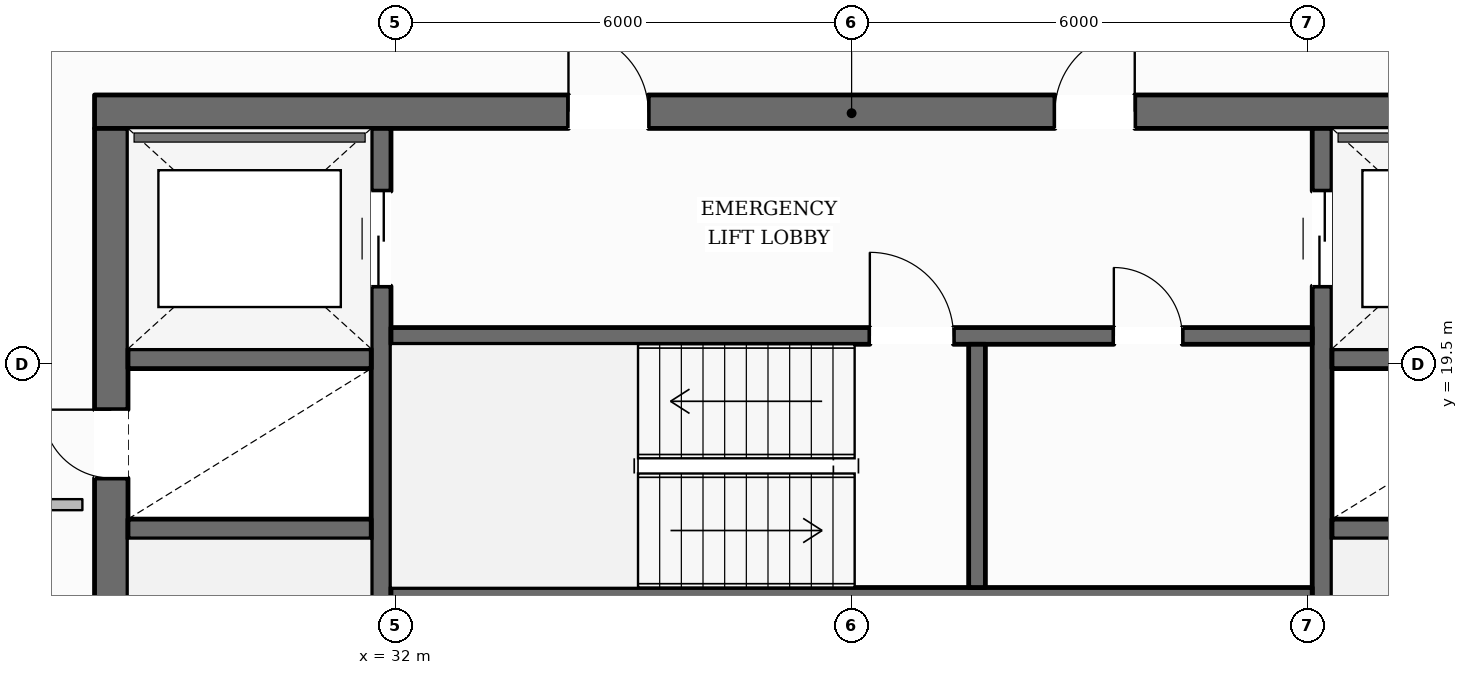
"""IFC4 building model, lengths in metres.
Left out: names, types, materials, properties, quantities, classifications, styles, units other than length and angle.
Written with IfcOpenShell. Run it as: python <this file> out.ifc"""

import sys

from ifc_helpers import new_model, si_unit, direction, frame, frame_2d, origin, place, context, subcontext, project, spatial, rectangle, extrude, element, fill, save


model = new_model("IFC4")
c1 = context("Model", 3, precision=1e-05, world=origin(), true_north=direction((0.0, 1.0)))
c2 = subcontext(c1, "Body", "Model", "MODEL_VIEW")
j1 = project(units=[si_unit("LENGTHUNIT", "METRE"), si_unit("PLANEANGLEUNIT", "RADIAN")], contexts=[c1])
p1 = place(None, origin())
s1 = spatial("IfcSite", under=j1, at=p1, CompositionType="ELEMENT")
p2 = place(p1, origin())
s2 = spatial("IfcBuilding", under=s1, at=p2, CompositionType="ELEMENT")
p3 = place(p2, frame((0.0, 0.0, 230.45)))
s3 = spatial("IfcBuildingStorey", under=s2, at=p3, CompositionType="ELEMENT", Elevation=230.45)
p4 = place(p3, frame((28.04, 22.82, 0.0), z_axis=(0.0, 0.0, 1.0), x_axis=(1.0, 0.0, 0.0)))
e1 = element("IfcWall", 1, at=p4, inside=s3, PredefinedType="SOLIDWALL", context=c2, shape_type="SweptSolid", body=[
    extrude(rectangle(XDim=19.92, YDim=0.44, at=frame_2d((9.96, 0.0))), origin(), (0.0, 0.0, 1.0), 3.43),
])
p5 = place(p4, frame((6.235, 0.0, 0.0)))
e2 = element("IfcOpeningElement", 2, at=p5, cuts=e1, PredefinedType="OPENING", context=c2, shape_type="SweptSolid", body=[
    extrude(rectangle(XDim=1.05, YDim=2.15, at=frame_2d((0.525, 1.075))), frame((0.0, 0.23, 0.0), z_axis=(0.0, -1.0, 0.0), x_axis=(1.0, 0.0, 0.0)), (0.0, 0.0, 1.0), 0.46),
])
p6 = place(p4, frame((12.635, 0.0, 0.0)))
e3 = element("IfcOpeningElement", 3, at=p6, cuts=e1, PredefinedType="OPENING", context=c2, shape_type="SweptSolid", body=[
    extrude(rectangle(XDim=1.05, YDim=2.15, at=frame_2d((0.525, 1.075))), frame((0.0, 0.23, 0.0), z_axis=(0.0, -1.0, 0.0), x_axis=(1.0, 0.0, 0.0)), (0.0, 0.0, 1.0), 0.46),
])
p7 = place(p3, frame((28.26, 9.6, 0.0), z_axis=(0.0, 0.0, 1.0), x_axis=(0.0, 1.0, 0.0)))
e4 = element("IfcWall", 4, at=p7, inside=s3, PredefinedType="SOLIDWALL", context=c2, shape_type="SweptSolid", body=[
    extrude(rectangle(XDim=13.0, YDim=0.44, at=frame_2d((6.5, 0.0))), origin(), (0.0, 0.0, 1.0), 3.43),
])
p8 = place(p7, frame((0.2, 0.0, 0.0)))
e5 = element("IfcOpeningElement", 5, at=p8, cuts=e4, PredefinedType="OPENING", context=c2, shape_type="SweptSolid", body=[
    extrude(rectangle(XDim=1.1, YDim=2.15, at=frame_2d((0.55, 1.075))), frame((0.0, 0.23, 0.0), z_axis=(0.0, -1.0, 0.0), x_axis=(1.0, 0.0, 0.0)), (0.0, 0.0, 1.0), 0.46),
])
p9 = place(p7, frame((8.4, 0.0, 0.0)))
e6 = element("IfcOpeningElement", 6, at=p9, cuts=e4, PredefinedType="OPENING", context=c2, shape_type="SweptSolid", body=[
    extrude(rectangle(XDim=0.9, YDim=2.1, at=frame_2d((0.45, 1.05))), frame((0.0, 0.23, 0.0), z_axis=(0.0, -1.0, 0.0), x_axis=(1.0, 0.0, 0.0)), (0.0, 0.0, 1.0), 0.46),
])
p10 = place(p3, frame((31.81, 9.6, 0.0), z_axis=(0.0, 0.0, 1.0), x_axis=(0.0, 1.0, 0.0)))
e7 = element("IfcWall", 7, at=p10, inside=s3, PredefinedType="SHEAR", context=c2, shape_type="SweptSolid", body=[
    extrude(rectangle(XDim=13.0, YDim=0.26, at=frame_2d((6.5, 0.0))), origin(), (0.0, 0.0, 1.0), 3.43),
])
p11 = place(p10, frame((10.925, 0.0, 0.0)))
e8 = element("IfcOpeningElement", 8, at=p11, cuts=e7, PredefinedType="OPENING", context=c2, shape_type="SweptSolid", body=[
    extrude(rectangle(XDim=1.25, YDim=2.25, at=frame_2d((0.625, 1.125))), frame((0.0, 0.14, 0.0), z_axis=(0.0, -1.0, 0.0), x_axis=(1.0, 0.0, 0.0)), (0.0, 0.0, 1.0), 0.28),
])
p12 = place(p3, frame((44.19, 9.6, 0.0), z_axis=(0.0, 0.0, 1.0), x_axis=(0.0, 1.0, 0.0)))
e9 = element("IfcWall", 9, at=p12, inside=s3, PredefinedType="SHEAR", context=c2, shape_type="SweptSolid", body=[
    extrude(rectangle(XDim=13.0, YDim=0.26, at=frame_2d((6.5, 0.0))), origin(), (0.0, 0.0, 1.0), 3.43),
])
p13 = place(p12, frame((10.925, 0.0, 0.0)))
e10 = element("IfcOpeningElement", 10, at=p13, cuts=e9, PredefinedType="OPENING", context=c2, shape_type="SweptSolid", body=[
    extrude(rectangle(XDim=1.25, YDim=2.25, at=frame_2d((0.625, 1.125))), frame((0.0, 0.14, 0.0), z_axis=(0.0, -1.0, 0.0), x_axis=(1.0, 0.0, 0.0)), (0.0, 0.0, 1.0), 0.28),
])
for number, where, z_axis, x_axis in (
    (11, (28.48, 17.33, 0.0), (0.0, 0.0, 1.0), (1.0, 0.0, 0.0)),
    (12, (28.48, 19.57, 0.0), (0.0, 0.0, 1.0), (1.0, 0.0, 0.0)),
    (13, (44.32, 17.33, 0.0), (0.0, 0.0, 1.0), (1.0, 0.0, 0.0)),
    (14, (44.32, 19.57, 0.0), (0.0, 0.0, 1.0), (1.0, 0.0, 0.0)),
):
    element("IfcWall", number, at=place(p3, frame(where, z_axis=z_axis, x_axis=x_axis)), inside=s3, PredefinedType="SHEAR", context=c2, shape_type="SweptSolid", body=[
        extrude(rectangle(XDim=3.2, YDim=0.26, at=frame_2d((1.6, 0.0))), origin(), (0.0, 0.0, 1.0), 3.43),
    ])
p14 = place(p3, frame((31.94, 19.87, 0.0), z_axis=(0.0, 0.0, 1.0), x_axis=(1.0, 0.0, 0.0)))
e15 = element("IfcWall", 15, at=p14, inside=s3, PredefinedType="SOLIDWALL", context=c2, shape_type="SweptSolid", body=[
    extrude(rectangle(XDim=12.12, YDim=0.22, at=frame_2d((6.06, 0.0))), origin(), (0.0, 0.0, 1.0), 3.43),
])
p15 = place(p14, frame((6.3, 0.0, 0.0)))
e16 = element("IfcOpeningElement", 16, at=p15, cuts=e15, PredefinedType="OPENING", context=c2, shape_type="SweptSolid", body=[
    extrude(rectangle(XDim=1.1, YDim=2.15, at=frame_2d((0.55, 1.075))), frame((0.0, 0.12, 0.0), z_axis=(0.0, -1.0, 0.0), x_axis=(1.0, 0.0, 0.0)), (0.0, 0.0, 1.0), 0.24),
])
p16 = place(p14, frame((9.51, 0.0, 0.0)))
e17 = element("IfcOpeningElement", 17, at=p16, cuts=e15, PredefinedType="OPENING", context=c2, shape_type="SweptSolid", body=[
    extrude(rectangle(XDim=0.9, YDim=2.1, at=frame_2d((0.45, 1.05))), frame((0.0, 0.12, 0.0), z_axis=(0.0, -1.0, 0.0), x_axis=(1.0, 0.0, 0.0)), (0.0, 0.0, 1.0), 0.24),
])
p17 = place(p3, frame((31.94, 16.45, 0.0), z_axis=(0.0, 0.0, 1.0), x_axis=(1.0, 0.0, 0.0)))
e18 = element("IfcWall", 18, at=p17, inside=s3, PredefinedType="SOLIDWALL", context=c2, shape_type="SweptSolid", body=[
    extrude(rectangle(XDim=12.12, YDim=0.22, at=frame_2d((6.06, 0.0))), origin(), (0.0, 0.0, 1.0), 3.43),
])
p18 = place(p3, frame((39.65, 16.56, 0.0), z_axis=(0.0, 0.0, 1.0), x_axis=(0.0, 1.0, 0.0)))
e19 = element("IfcWall", 19, at=p18, inside=s3, PredefinedType="SOLIDWALL", context=c2, shape_type="SweptSolid", body=[
    extrude(rectangle(XDim=3.2, YDim=0.22, at=frame_2d((1.6, 0.0))), origin(), (0.0, 0.0, 1.0), 3.43),
])
p19 = place(p3, frame((14.597, 10.907, 0.0), z_axis=(0.0, 0.0, 1.0), x_axis=(0.494693460531, 0.869067534837, 0.0)))
e20 = element("IfcWall", 20, at=p19, inside=s3, PredefinedType="STANDARD", context=c2, shape_type="SweptSolid", body=[
    extrude(rectangle(XDim=39.744, YDim=0.35, at=frame_2d((19.872, 0.0))), origin(), (0.0, 0.0, 1.0), 2.962),
])
p20 = place(p19, frame((35.308, 0.0, 0.55)))
e21 = element("IfcOpeningElement", 21, at=p20, cuts=e20, PredefinedType="OPENING", context=c2, shape_type="SweptSolid", body=[
    extrude(rectangle(XDim=1.45, YDim=1.6, at=frame_2d((0.725, 0.8))), frame((0.0, 0.185, 0.0), z_axis=(0.0, -1.0, 0.0), x_axis=(1.0, 0.0, 0.0)), (0.0, 0.0, 1.0), 0.37),
])
p21 = place(p19, frame((28.843, 0.0, 0.55)))
e22 = element("IfcOpeningElement", 22, at=p21, cuts=e20, PredefinedType="OPENING", context=c2, shape_type="SweptSolid", body=[
    extrude(rectangle(XDim=1.45, YDim=1.6, at=frame_2d((0.725, 0.8))), frame((0.0, 0.185, 0.0), z_axis=(0.0, -1.0, 0.0), x_axis=(1.0, 0.0, 0.0)), (0.0, 0.0, 1.0), 0.37),
])
p22 = place(p19, frame((22.377, 0.0, 0.55)))
e23 = element("IfcOpeningElement", 23, at=p22, cuts=e20, PredefinedType="OPENING", context=c2, shape_type="SweptSolid", body=[
    extrude(rectangle(XDim=1.45, YDim=1.6, at=frame_2d((0.725, 0.8))), frame((0.0, 0.185, 0.0), z_axis=(0.0, -1.0, 0.0), x_axis=(1.0, 0.0, 0.0)), (0.0, 0.0, 1.0), 0.37),
])
p23 = place(p19, frame((9.446, 0.0, 0.55)))
e24 = element("IfcOpeningElement", 24, at=p23, cuts=e20, PredefinedType="OPENING", context=c2, shape_type="SweptSolid", body=[
    extrude(rectangle(XDim=1.45, YDim=1.6, at=frame_2d((0.725, 0.8))), frame((0.0, 0.185, 0.0), z_axis=(0.0, -1.0, 0.0), x_axis=(1.0, 0.0, 0.0)), (0.0, 0.0, 1.0), 0.37),
])
p24 = place(p19, frame((2.98, 0.0, 0.55)))
e25 = element("IfcOpeningElement", 25, at=p24, cuts=e20, PredefinedType="OPENING", context=c2, shape_type="SweptSolid", body=[
    extrude(rectangle(XDim=1.45, YDim=1.6, at=frame_2d((0.725, 0.8))), frame((0.0, 0.185, 0.0), z_axis=(0.0, -1.0, 0.0), x_axis=(1.0, 0.0, 0.0)), (0.0, 0.0, 1.0), 0.37),
])
p25 = place(p3, frame((41.688, 45.48, 0.0), z_axis=(0.0, 0.0, 1.0), x_axis=(0.491295447758, -0.870992986775, 0.0)))
e26 = element("IfcWall", 26, at=p25, inside=s3, PredefinedType="STANDARD", context=c2, shape_type="SweptSolid", body=[
    extrude(rectangle(XDim=39.483, YDim=0.35, at=frame_2d((19.742, 0.0))), origin(), (0.0, 0.0, 1.0), 2.962),
])
p26 = place(p25, frame((9.471, 0.0, 0.0)))
e27 = element("IfcOpeningElement", 27, at=p26, cuts=e26, PredefinedType="OPENING", context=c2, shape_type="SweptSolid", body=[
    extrude(rectangle(XDim=1.0, YDim=2.2, at=frame_2d((0.5, 1.1))), frame((0.0, 0.185, 0.0), z_axis=(0.0, -1.0, 0.0), x_axis=(1.0, 0.0, 0.0)), (0.0, 0.0, 1.0), 0.37),
])
p27 = place(p25, frame((35.076, 0.0, 0.55)))
e28 = element("IfcOpeningElement", 28, at=p27, cuts=e26, PredefinedType="OPENING", context=c2, shape_type="SweptSolid", body=[
    extrude(rectangle(XDim=1.45, YDim=1.6, at=frame_2d((0.725, 0.8))), frame((0.0, 0.185, 0.0), z_axis=(0.0, -1.0, 0.0), x_axis=(1.0, 0.0, 0.0)), (0.0, 0.0, 1.0), 0.37),
])
p28 = place(p25, frame((28.654, 0.0, 0.55)))
e29 = element("IfcOpeningElement", 29, at=p28, cuts=e26, PredefinedType="OPENING", context=c2, shape_type="SweptSolid", body=[
    extrude(rectangle(XDim=1.45, YDim=1.6, at=frame_2d((0.725, 0.8))), frame((0.0, 0.185, 0.0), z_axis=(0.0, -1.0, 0.0), x_axis=(1.0, 0.0, 0.0)), (0.0, 0.0, 1.0), 0.37),
])
p29 = place(p25, frame((22.232, 0.0, 0.55)))
e30 = element("IfcOpeningElement", 30, at=p29, cuts=e26, PredefinedType="OPENING", context=c2, shape_type="SweptSolid", body=[
    extrude(rectangle(XDim=1.45, YDim=1.6, at=frame_2d((0.725, 0.8))), frame((0.0, 0.185, 0.0), z_axis=(0.0, -1.0, 0.0), x_axis=(1.0, 0.0, 0.0)), (0.0, 0.0, 1.0), 0.37),
])
p30 = place(p25, frame((2.967, 0.0, 0.55)))
e31 = element("IfcOpeningElement", 31, at=p30, cuts=e26, PredefinedType="OPENING", context=c2, shape_type="SweptSolid", body=[
    extrude(rectangle(XDim=1.45, YDim=1.6, at=frame_2d((0.725, 0.8))), frame((0.0, 0.185, 0.0), z_axis=(0.0, -1.0, 0.0), x_axis=(1.0, 0.0, 0.0)), (0.0, 0.0, 1.0), 0.37),
])
p31 = place(p3, frame((27.88, 17.65, 0.0), z_axis=(0.0, 0.0, 1.0), x_axis=(-1.0, 0.0, 0.0)))
e32 = element("IfcWall", 32, at=p31, inside=s3, PredefinedType="PARTITIONING", context=c2, shape_type="SweptSolid", body=[
    extrude(rectangle(XDim=1.82, YDim=0.145, at=frame_2d((0.91, 0.0))), origin(), (0.0, 0.0, 1.0), 3.43),
])
p32 = place(p15, origin())
e33 = element("IfcDoor", 33, at=p32, inside=s3, OperationType="SINGLE_SWING_LEFT", PredefinedType="DOOR", context=c2, shape_type="SweptSolid", body=[
    extrude(rectangle(XDim=1.1, YDim=2.15, at=frame_2d((0.55, 1.075))), frame((0.0, 0.025, 0.0), z_axis=(0.0, -1.0, 0.0), x_axis=(1.0, 0.0, 0.0)), (0.0, 0.0, 1.0), 0.05),
])
fill(e16, e33)
p33 = place(p9, origin())
e34 = element("IfcDoor", 34, at=p33, inside=s3, OperationType="SINGLE_SWING_RIGHT", PredefinedType="DOOR", context=c2, shape_type="SweptSolid", body=[
    extrude(rectangle(XDim=0.9, YDim=2.1, at=frame_2d((0.45, 1.05))), frame((0.0, 0.025, 0.0), z_axis=(0.0, -1.0, 0.0), x_axis=(1.0, 0.0, 0.0)), (0.0, 0.0, 1.0), 0.05),
])
fill(e6, e34)
p34 = place(p5, origin())
e35 = element("IfcDoor", 35, at=p34, inside=s3, OperationType="SINGLE_SWING_LEFT", PredefinedType="DOOR", context=c2, shape_type="SweptSolid", body=[
    extrude(rectangle(XDim=1.05, YDim=2.15, at=frame_2d((0.525, 1.075))), frame((0.0, 0.025, 0.0), z_axis=(0.0, -1.0, 0.0), x_axis=(1.0, 0.0, 0.0)), (0.0, 0.0, 1.0), 0.05),
])
fill(e2, e35)
p35 = place(p6, origin())
e36 = element("IfcDoor", 36, at=p35, inside=s3, OperationType="SINGLE_SWING_RIGHT", PredefinedType="DOOR", context=c2, shape_type="SweptSolid", body=[
    extrude(rectangle(XDim=1.05, YDim=2.15, at=frame_2d((0.525, 1.075))), frame((0.0, 0.025, 0.0), z_axis=(0.0, -1.0, 0.0), x_axis=(1.0, 0.0, 0.0)), (0.0, 0.0, 1.0), 0.05),
])
fill(e3, e36)
p36 = place(p11, origin())
e37 = element("IfcDoor", 37, at=p36, inside=s3, OperationType="DOUBLE_DOOR_SLIDING", PredefinedType="DOOR", context=c2, shape_type="SweptSolid", body=[
    extrude(rectangle(XDim=1.25, YDim=2.25, at=frame_2d((0.625, 1.125))), frame((0.0, 0.025, 0.0), z_axis=(0.0, -1.0, 0.0), x_axis=(1.0, 0.0, 0.0)), (0.0, 0.0, 1.0), 0.05),
])
fill(e8, e37)
p37 = place(p13, origin())
e38 = element("IfcDoor", 38, at=p37, inside=s3, OperationType="DOUBLE_DOOR_SLIDING", PredefinedType="DOOR", context=c2, shape_type="SweptSolid", body=[
    extrude(rectangle(XDim=1.25, YDim=2.25, at=frame_2d((0.625, 1.125))), frame((0.0, 0.025, 0.0), z_axis=(0.0, -1.0, 0.0), x_axis=(1.0, 0.0, 0.0)), (0.0, 0.0, 1.0), 0.05),
])
fill(e10, e38)
p38 = place(p16, origin())
e39 = element("IfcDoor", 39, at=p38, inside=s3, OperationType="SINGLE_SWING_LEFT", PredefinedType="DOOR", context=c2, shape_type="SweptSolid", body=[
    extrude(rectangle(XDim=0.9, YDim=2.1, at=frame_2d((0.45, 1.05))), frame((0.0, 0.025, 0.0), z_axis=(0.0, -1.0, 0.0), x_axis=(1.0, 0.0, 0.0)), (0.0, 0.0, 1.0), 0.05),
])
fill(e17, e39)
save(model, sys.argv[1])
